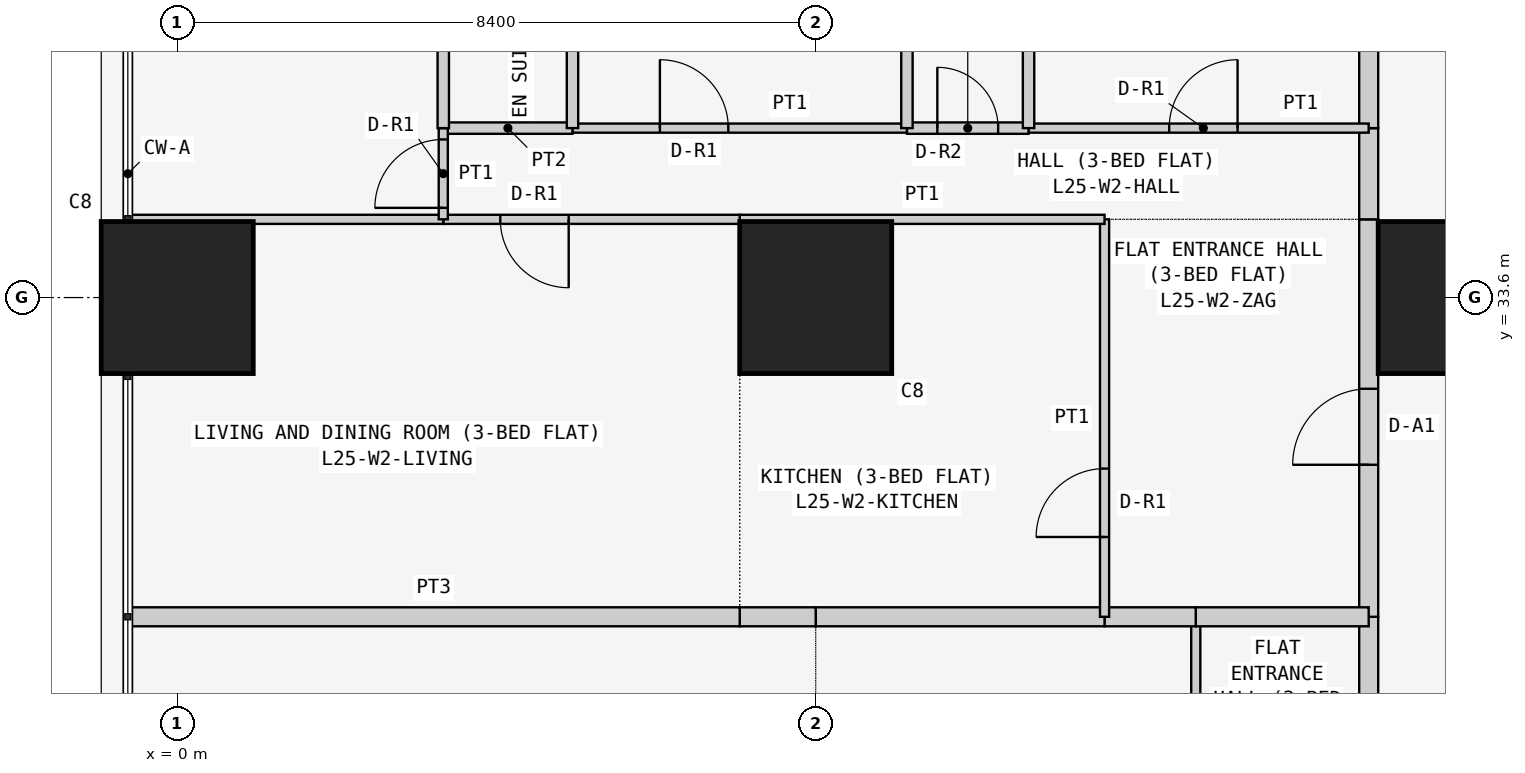
"""IFC4 building model, lengths in metres.
Left out: names, types, materials, properties, quantities, classifications, styles, units other than length and angle.
Written with IfcOpenShell. Run it as: python <this file> out.ifc"""

import sys

from ifc_helpers import new_model, si_unit, direction, frame, frame_2d, origin, origin_2d, place, context, subcontext, project, spatial, rectangle, extrude, element, fill, save


model = new_model("IFC4")
c1 = context("Model", 3, precision=1e-05, world=origin(), true_north=direction((0.0, 1.0)))
c2 = subcontext(c1, "Body", "Model", "MODEL_VIEW")
j1 = project(units=[si_unit("LENGTHUNIT", "METRE"), si_unit("PLANEANGLEUNIT", "RADIAN")], contexts=[c1])
p1 = place(None, origin())
s1 = spatial("IfcSite", under=j1, at=p1, CompositionType="ELEMENT")
p2 = place(p1, origin())
s2 = spatial("IfcBuilding", under=s1, at=p2, CompositionType="ELEMENT")
p3 = place(p2, frame((0.0, 0.0, 99.3)))
s3 = spatial("IfcBuildingStorey", under=s2, at=p3, CompositionType="ELEMENT", Elevation=99.3)
for number, where, z_axis, x_axis in (
    (1, (0.0, 33.6, 0.0), (0.0, 0.0, 1.0), (1.0, 0.0, 0.0)),
    (2, (8.4, 33.6, 0.0), (0.0, 0.0, 1.0), (1.0, 0.0, 0.0)),
    (3, (16.8, 33.6, 0.0), (0.0, 0.0, 1.0), (1.0, 0.0, 0.0)),
):
    element("IfcColumn", number, at=place(p3, frame(where, z_axis=z_axis, x_axis=x_axis)), inside=s3, PredefinedType="COLUMN", context=c2, shape_type="SweptSolid", body=[
        extrude(rectangle(XDim=2.0, YDim=2.0, at=origin_2d()), origin(), (0.0, 0.0, 1.0), 3.6),
    ])
p4 = place(p3, frame((15.675, 22.3, 0.0), z_axis=(0.0, 0.0, 1.0), x_axis=(0.0, 1.0, 0.0)))
e4 = element("IfcWall", 4, at=p4, inside=s3, PredefinedType="PARTITIONING", context=c2, shape_type="SweptSolid", body=[
    extrude(rectangle(XDim=7.1, YDim=0.25, at=frame_2d((3.55, 0.0))), origin(), (0.0, 0.0, 1.0), 3.35),
])
p5 = place(p4, frame((4.05, 0.0, 0.0)))
e5 = element("IfcOpeningElement", 5, at=p5, cuts=e4, PredefinedType="OPENING", context=c2, shape_type="SweptSolid", body=[
    extrude(rectangle(XDim=1.0, YDim=2.1, at=frame_2d((0.5, 1.05))), frame((0.0, 0.135, 0.0), z_axis=(0.0, -1.0, 0.0), x_axis=(1.0, 0.0, 0.0)), (0.0, 0.0, 1.0), 0.27),
])
p6 = place(p3, frame((15.675, 29.4, 0.0), z_axis=(0.0, 0.0, 1.0), x_axis=(0.0, 1.0, 0.0)))
e6 = element("IfcWall", 6, at=p6, inside=s3, PredefinedType="PARTITIONING", context=c2, shape_type="SweptSolid", body=[
    extrude(rectangle(XDim=5.229, YDim=0.25, at=frame_2d((2.615, 0.0))), origin(), (0.0, 0.0, 1.0), 3.35),
])
p7 = place(p6, frame((2.0, 0.0, 0.0)))
e7 = element("IfcOpeningElement", 7, at=p7, cuts=e6, PredefinedType="OPENING", context=c2, shape_type="SweptSolid", body=[
    extrude(rectangle(XDim=1.0, YDim=2.1, at=frame_2d((0.5, 1.05))), frame((0.0, 0.135, 0.0), z_axis=(0.0, -1.0, 0.0), x_axis=(1.0, 0.0, 0.0)), (0.0, 0.0, 1.0), 0.27),
])
p8 = place(p3, frame((15.675, 34.629, 0.0), z_axis=(0.0, 0.0, 1.0), x_axis=(0.0, 1.0, 0.0)))
e8 = element("IfcWall", 8, at=p8, inside=s3, PredefinedType="PARTITIONING", context=c2, shape_type="SweptSolid", body=[
    extrude(rectangle(XDim=1.2, YDim=0.25, at=frame_2d((0.6, 0.0))), origin(), (0.0, 0.0, 1.0), 3.35),
])
p9 = place(p3, frame((15.675, 35.829, 0.0), z_axis=(0.0, 0.0, 1.0), x_axis=(0.0, 1.0, 0.0)))
e9 = element("IfcWall", 9, at=p9, inside=s3, PredefinedType="PARTITIONING", context=c2, shape_type="SweptSolid", body=[
    extrude(rectangle(XDim=6.871, YDim=0.25, at=frame_2d((3.436, 0.0))), origin(), (0.0, 0.0, 1.0), 3.35),
])
p10 = place(p3, frame((13.4, 29.4, 0.0), z_axis=(0.0, 0.0, 1.0), x_axis=(0.0, -1.0, 0.0)))
e10 = element("IfcWall", 10, at=p10, inside=s3, PredefinedType="PARTITIONING", context=c2, shape_type="SweptSolid", body=[
    extrude(rectangle(XDim=4.0, YDim=0.12, at=frame_2d((2.0, 0.0))), origin(), (0.0, 0.0, 1.0), 3.35),
])
p11 = place(p10, frame((1.05, 0.0, 0.0)))
e11 = element("IfcOpeningElement", 11, at=p11, cuts=e10, PredefinedType="OPENING", context=c2, shape_type="SweptSolid", body=[
    extrude(rectangle(XDim=0.9, YDim=2.1, at=frame_2d((0.45, 1.05))), frame((0.0, 0.07, 0.0), z_axis=(0.0, -1.0, 0.0), x_axis=(1.0, 0.0, 0.0)), (0.0, 0.0, 1.0), 0.14),
])
p12 = place(p3, frame((15.675, 29.4, 0.0), z_axis=(0.0, 0.0, 1.0), x_axis=(-1.0, 0.0, 0.0)))
e12 = element("IfcWall", 12, at=p12, inside=s3, PredefinedType="PARTITIONING", context=c2, shape_type="SweptSolid", body=[
    extrude(rectangle(XDim=2.275, YDim=0.25, at=frame_2d((1.138, 0.0))), origin(), (0.0, 0.0, 1.0), 3.35),
])
p13 = place(p3, frame((12.2, 29.4, 0.0), z_axis=(0.0, 0.0, 1.0), x_axis=(1.0, 0.0, 0.0)))
e13 = element("IfcWall", 13, at=p13, inside=s3, PredefinedType="PARTITIONING", context=c2, shape_type="SweptSolid", body=[
    extrude(rectangle(XDim=1.2, YDim=0.25, at=frame_2d((0.6, 0.0))), origin(), (0.0, 0.0, 1.0), 3.35),
])
p14 = place(p3, frame((8.4, 29.4, 0.0), z_axis=(0.0, 0.0, 1.0), x_axis=(1.0, 0.0, 0.0)))
e14 = element("IfcWall", 14, at=p14, inside=s3, PredefinedType="PARTITIONING", context=c2, shape_type="SweptSolid", body=[
    extrude(rectangle(XDim=3.8, YDim=0.25, at=frame_2d((1.9, 0.0))), origin(), (0.0, 0.0, 1.0), 3.35),
])
p15 = place(p3, frame((7.4, 29.4, 0.0), z_axis=(0.0, 0.0, 1.0), x_axis=(1.0, 0.0, 0.0)))
e15 = element("IfcWall", 15, at=p15, inside=s3, PredefinedType="PARTITIONING", context=c2, shape_type="SweptSolid", body=[
    extrude(rectangle(XDim=1.0, YDim=0.25, at=frame_2d((0.5, 0.0))), origin(), (0.0, 0.0, 1.0), 3.35),
])
p16 = place(p3, frame((-0.65, 29.4, 0.0), z_axis=(0.0, 0.0, 1.0), x_axis=(1.0, 0.0, 0.0)))
e16 = element("IfcWall", 16, at=p16, inside=s3, PredefinedType="PARTITIONING", context=c2, shape_type="SweptSolid", body=[
    extrude(rectangle(XDim=8.05, YDim=0.25, at=frame_2d((4.025, 0.0))), origin(), (0.0, 0.0, 1.0), 3.35),
])
p17 = place(p3, frame((12.2, 29.4, 0.0), z_axis=(0.0, 0.0, 1.0), x_axis=(0.0, 1.0, 0.0)))
e17 = element("IfcWall", 17, at=p17, inside=s3, PredefinedType="PARTITIONING", context=c2, shape_type="SweptSolid", body=[
    extrude(rectangle(XDim=5.229, YDim=0.12, at=frame_2d((2.615, 0.0))), origin(), (0.0, 0.0, 1.0), 3.35),
])
p18 = place(p17, frame((1.05, 0.0, 0.0)))
e18 = element("IfcOpeningElement", 18, at=p18, cuts=e17, PredefinedType="OPENING", context=c2, shape_type="SweptSolid", body=[
    extrude(rectangle(XDim=0.9, YDim=2.1, at=frame_2d((0.45, 1.05))), frame((0.0, 0.07, 0.0), z_axis=(0.0, -1.0, 0.0), x_axis=(1.0, 0.0, 0.0)), (0.0, 0.0, 1.0), 0.14),
])
p19 = place(p3, frame((7.4, 34.629, 0.0), z_axis=(0.0, 0.0, 1.0), x_axis=(1.0, 0.0, 0.0)))
e19 = element("IfcWall", 19, at=p19, inside=s3, PredefinedType="PARTITIONING", context=c2, shape_type="SweptSolid", body=[
    extrude(rectangle(XDim=4.8, YDim=0.12, at=frame_2d((2.4, 0.0))), origin(), (0.0, 0.0, 1.0), 3.35),
])
p20 = place(p3, frame((3.5, 34.629, 0.0), z_axis=(0.0, 0.0, 1.0), x_axis=(1.0, 0.0, 0.0)))
e20 = element("IfcWall", 20, at=p20, inside=s3, PredefinedType="PARTITIONING", context=c2, shape_type="SweptSolid", body=[
    extrude(rectangle(XDim=3.9, YDim=0.12, at=frame_2d((1.95, 0.0))), origin(), (0.0, 0.0, 1.0), 3.35),
])
p21 = place(p20, frame((0.75, 0.0, 0.0)))
e21 = element("IfcOpeningElement", 21, at=p21, cuts=e20, PredefinedType="OPENING", context=c2, shape_type="SweptSolid", body=[
    extrude(rectangle(XDim=0.9, YDim=2.1, at=frame_2d((0.45, 1.05))), frame((0.0, 0.07, 0.0), z_axis=(0.0, -1.0, 0.0), x_axis=(1.0, 0.0, 0.0)), (0.0, 0.0, 1.0), 0.14),
])
p22 = place(p3, frame((-0.65, 34.629, 0.0), z_axis=(0.0, 0.0, 1.0), x_axis=(1.0, 0.0, 0.0)))
e22 = element("IfcWall", 22, at=p22, inside=s3, PredefinedType="PARTITIONING", context=c2, shape_type="SweptSolid", body=[
    extrude(rectangle(XDim=4.15, YDim=0.12, at=frame_2d((2.075, 0.0))), origin(), (0.0, 0.0, 1.0), 3.35),
])
p23 = place(p3, frame((11.2, 35.829, 0.0), z_axis=(0.0, 0.0, 1.0), x_axis=(1.0, 0.0, 0.0)))
e23 = element("IfcWall", 23, at=p23, inside=s3, PredefinedType="PARTITIONING", context=c2, shape_type="SweptSolid", body=[
    extrude(rectangle(XDim=4.475, YDim=0.12, at=frame_2d((2.238, 0.0))), origin(), (0.0, 0.0, 1.0), 3.35),
])
p24 = place(p23, frame((1.85, 0.0, 0.0)))
e24 = element("IfcOpeningElement", 24, at=p24, cuts=e23, PredefinedType="OPENING", context=c2, shape_type="SweptSolid", body=[
    extrude(rectangle(XDim=0.9, YDim=2.1, at=frame_2d((0.45, 1.05))), frame((0.0, 0.07, 0.0), z_axis=(0.0, -1.0, 0.0), x_axis=(1.0, 0.0, 0.0)), (0.0, 0.0, 1.0), 0.14),
])
p25 = place(p3, frame((9.6, 35.829, 0.0), z_axis=(0.0, 0.0, 1.0), x_axis=(1.0, 0.0, 0.0)))
e25 = element("IfcWall", 25, at=p25, inside=s3, PredefinedType="PARTITIONING", context=c2, shape_type="SweptSolid", body=[
    extrude(rectangle(XDim=1.6, YDim=0.15, at=frame_2d((0.8, 0.0))), origin(), (0.0, 0.0, 1.0), 3.35),
])
p26 = place(p25, frame((0.4, 0.0, 0.0)))
e26 = element("IfcOpeningElement", 26, at=p26, cuts=e25, PredefinedType="OPENING", context=c2, shape_type="SweptSolid", body=[
    extrude(rectangle(XDim=0.8, YDim=2.1, at=frame_2d((0.4, 1.05))), frame((0.0, 0.085, 0.0), z_axis=(0.0, -1.0, 0.0), x_axis=(1.0, 0.0, 0.0)), (0.0, 0.0, 1.0), 0.17),
])
p27 = place(p3, frame((5.2, 35.829, 0.0), z_axis=(0.0, 0.0, 1.0), x_axis=(1.0, 0.0, 0.0)))
e27 = element("IfcWall", 27, at=p27, inside=s3, PredefinedType="PARTITIONING", context=c2, shape_type="SweptSolid", body=[
    extrude(rectangle(XDim=4.4, YDim=0.12, at=frame_2d((2.2, 0.0))), origin(), (0.0, 0.0, 1.0), 3.35),
])
p28 = place(p27, frame((1.15, 0.0, 0.0)))
e28 = element("IfcOpeningElement", 28, at=p28, cuts=e27, PredefinedType="OPENING", context=c2, shape_type="SweptSolid", body=[
    extrude(rectangle(XDim=0.9, YDim=2.1, at=frame_2d((0.45, 1.05))), frame((0.0, 0.07, 0.0), z_axis=(0.0, -1.0, 0.0), x_axis=(1.0, 0.0, 0.0)), (0.0, 0.0, 1.0), 0.14),
])
p29 = place(p3, frame((3.5, 35.829, 0.0), z_axis=(0.0, 0.0, 1.0), x_axis=(1.0, 0.0, 0.0)))
e29 = element("IfcWall", 29, at=p29, inside=s3, PredefinedType="PARTITIONING", context=c2, shape_type="SweptSolid", body=[
    extrude(rectangle(XDim=1.7, YDim=0.15, at=frame_2d((0.85, 0.0))), origin(), (0.0, 0.0, 1.0), 3.35),
])
p30 = place(p3, frame((3.5, 34.629, 0.0), z_axis=(0.0, 0.0, 1.0), x_axis=(0.0, 1.0, 0.0)))
e30 = element("IfcWall", 30, at=p30, inside=s3, PredefinedType="PARTITIONING", context=c2, shape_type="SweptSolid", body=[
    extrude(rectangle(XDim=1.2, YDim=0.12, at=frame_2d((0.6, 0.0))), origin(), (0.0, 0.0, 1.0), 3.35),
])
p31 = place(p30, frame((0.151, 0.0, 0.0)))
e31 = element("IfcOpeningElement", 31, at=p31, cuts=e30, PredefinedType="OPENING", context=c2, shape_type="SweptSolid", body=[
    extrude(rectangle(XDim=0.9, YDim=2.1, at=frame_2d((0.45, 1.05))), frame((0.0, 0.07, 0.0), z_axis=(0.0, -1.0, 0.0), x_axis=(1.0, 0.0, 0.0)), (0.0, 0.0, 1.0), 0.14),
])
for number, where, z_axis, x_axis in (
    (32, (11.2, 35.829, 0.0), (0.0, 0.0, 1.0), (0.0, 1.0, 0.0)),
    (33, (9.6, 35.829, 0.0), (0.0, 0.0, 1.0), (0.0, 1.0, 0.0)),
    (34, (5.2, 35.829, 0.0), (0.0, 0.0, 1.0), (0.0, 1.0, 0.0)),
):
    element("IfcWall", number, at=place(p3, frame(where, z_axis=z_axis, x_axis=x_axis)), inside=s3, PredefinedType="PARTITIONING", context=c2, shape_type="SweptSolid", body=[
        extrude(rectangle(XDim=6.871, YDim=0.15, at=frame_2d((3.436, 0.0))), origin(), (0.0, 0.0, 1.0), 3.35),
    ])
p32 = place(p3, frame((3.5, 35.829, 0.0), z_axis=(0.0, 0.0, 1.0), x_axis=(0.0, 1.0, 0.0)))
e35 = element("IfcWall", 35, at=p32, inside=s3, PredefinedType="PARTITIONING", context=c2, shape_type="SweptSolid", body=[
    extrude(rectangle(XDim=6.871, YDim=0.15, at=frame_2d((3.436, 0.0))), origin(), (0.0, 0.0, 1.0), 3.35),
])
p33 = place(p32, frame((3.171, 0.0, 0.0)))
e36 = element("IfcOpeningElement", 36, at=p33, cuts=e35, PredefinedType="OPENING", context=c2, shape_type="SweptSolid", body=[
    extrude(rectangle(XDim=0.8, YDim=2.1, at=frame_2d((0.4, 1.05))), frame((0.0, 0.085, 0.0), z_axis=(0.0, -1.0, 0.0), x_axis=(1.0, 0.0, 0.0)), (0.0, 0.0, 1.0), 0.17),
])
p34 = place(p7, origin())
e37 = element("IfcDoor", 37, at=p34, inside=s3, OperationType="SINGLE_SWING_LEFT", PredefinedType="DOOR", context=c2, shape_type="SweptSolid", body=[
    extrude(rectangle(XDim=1.0, YDim=2.1, at=frame_2d((0.5, 1.05))), frame((0.0, 0.025, 0.0), z_axis=(0.0, -1.0, 0.0), x_axis=(1.0, 0.0, 0.0)), (0.0, 0.0, 1.0), 0.05),
])
fill(e7, e37)
p35 = place(p18, origin())
e38 = element("IfcDoor", 38, at=p35, inside=s3, OperationType="SINGLE_SWING_LEFT", PredefinedType="DOOR", context=c2, shape_type="SweptSolid", body=[
    extrude(rectangle(XDim=0.9, YDim=2.1, at=frame_2d((0.45, 1.05))), frame((0.0, 0.025, 0.0), z_axis=(0.0, -1.0, 0.0), x_axis=(1.0, 0.0, 0.0)), (0.0, 0.0, 1.0), 0.05),
])
fill(e18, e38)
p36 = place(p21, frame((0.9, 0.0, 0.0), z_axis=(0.0, 0.0, 1.0), x_axis=(-1.0, 0.0, 0.0)))
e39 = element("IfcDoor", 39, at=p36, inside=s3, OperationType="SINGLE_SWING_LEFT", PredefinedType="DOOR", context=c2, shape_type="SweptSolid", body=[
    extrude(rectangle(XDim=0.9, YDim=2.1, at=frame_2d((0.45, 1.05))), frame((0.0, 0.025, 0.0), z_axis=(0.0, -1.0, 0.0), x_axis=(1.0, 0.0, 0.0)), (0.0, 0.0, 1.0), 0.05),
])
fill(e21, e39)
p37 = place(p24, origin())
e40 = element("IfcDoor", 40, at=p37, inside=s3, OperationType="SINGLE_SWING_RIGHT", PredefinedType="DOOR", context=c2, shape_type="SweptSolid", body=[
    extrude(rectangle(XDim=0.9, YDim=2.1, at=frame_2d((0.45, 1.05))), frame((0.0, 0.025, 0.0), z_axis=(0.0, -1.0, 0.0), x_axis=(1.0, 0.0, 0.0)), (0.0, 0.0, 1.0), 0.05),
])
fill(e24, e40)
p38 = place(p26, origin())
e41 = element("IfcDoor", 41, at=p38, inside=s3, OperationType="SINGLE_SWING_LEFT", PredefinedType="DOOR", context=c2, shape_type="SweptSolid", body=[
    extrude(rectangle(XDim=0.8, YDim=2.1, at=frame_2d((0.4, 1.05))), frame((0.0, 0.025, 0.0), z_axis=(0.0, -1.0, 0.0), x_axis=(1.0, 0.0, 0.0)), (0.0, 0.0, 1.0), 0.05),
])
fill(e26, e41)
p39 = place(p28, origin())
e42 = element("IfcDoor", 42, at=p39, inside=s3, OperationType="SINGLE_SWING_LEFT", PredefinedType="DOOR", context=c2, shape_type="SweptSolid", body=[
    extrude(rectangle(XDim=0.9, YDim=2.1, at=frame_2d((0.45, 1.05))), frame((0.0, 0.025, 0.0), z_axis=(0.0, -1.0, 0.0), x_axis=(1.0, 0.0, 0.0)), (0.0, 0.0, 1.0), 0.05),
])
fill(e28, e42)
p40 = place(p31, origin())
e43 = element("IfcDoor", 43, at=p40, inside=s3, OperationType="SINGLE_SWING_LEFT", PredefinedType="DOOR", context=c2, shape_type="SweptSolid", body=[
    extrude(rectangle(XDim=0.9, YDim=2.1, at=frame_2d((0.45, 1.05))), frame((0.0, 0.025, 0.0), z_axis=(0.0, -1.0, 0.0), x_axis=(1.0, 0.0, 0.0)), (0.0, 0.0, 1.0), 0.05),
])
fill(e31, e43)
save(model, sys.argv[1])
